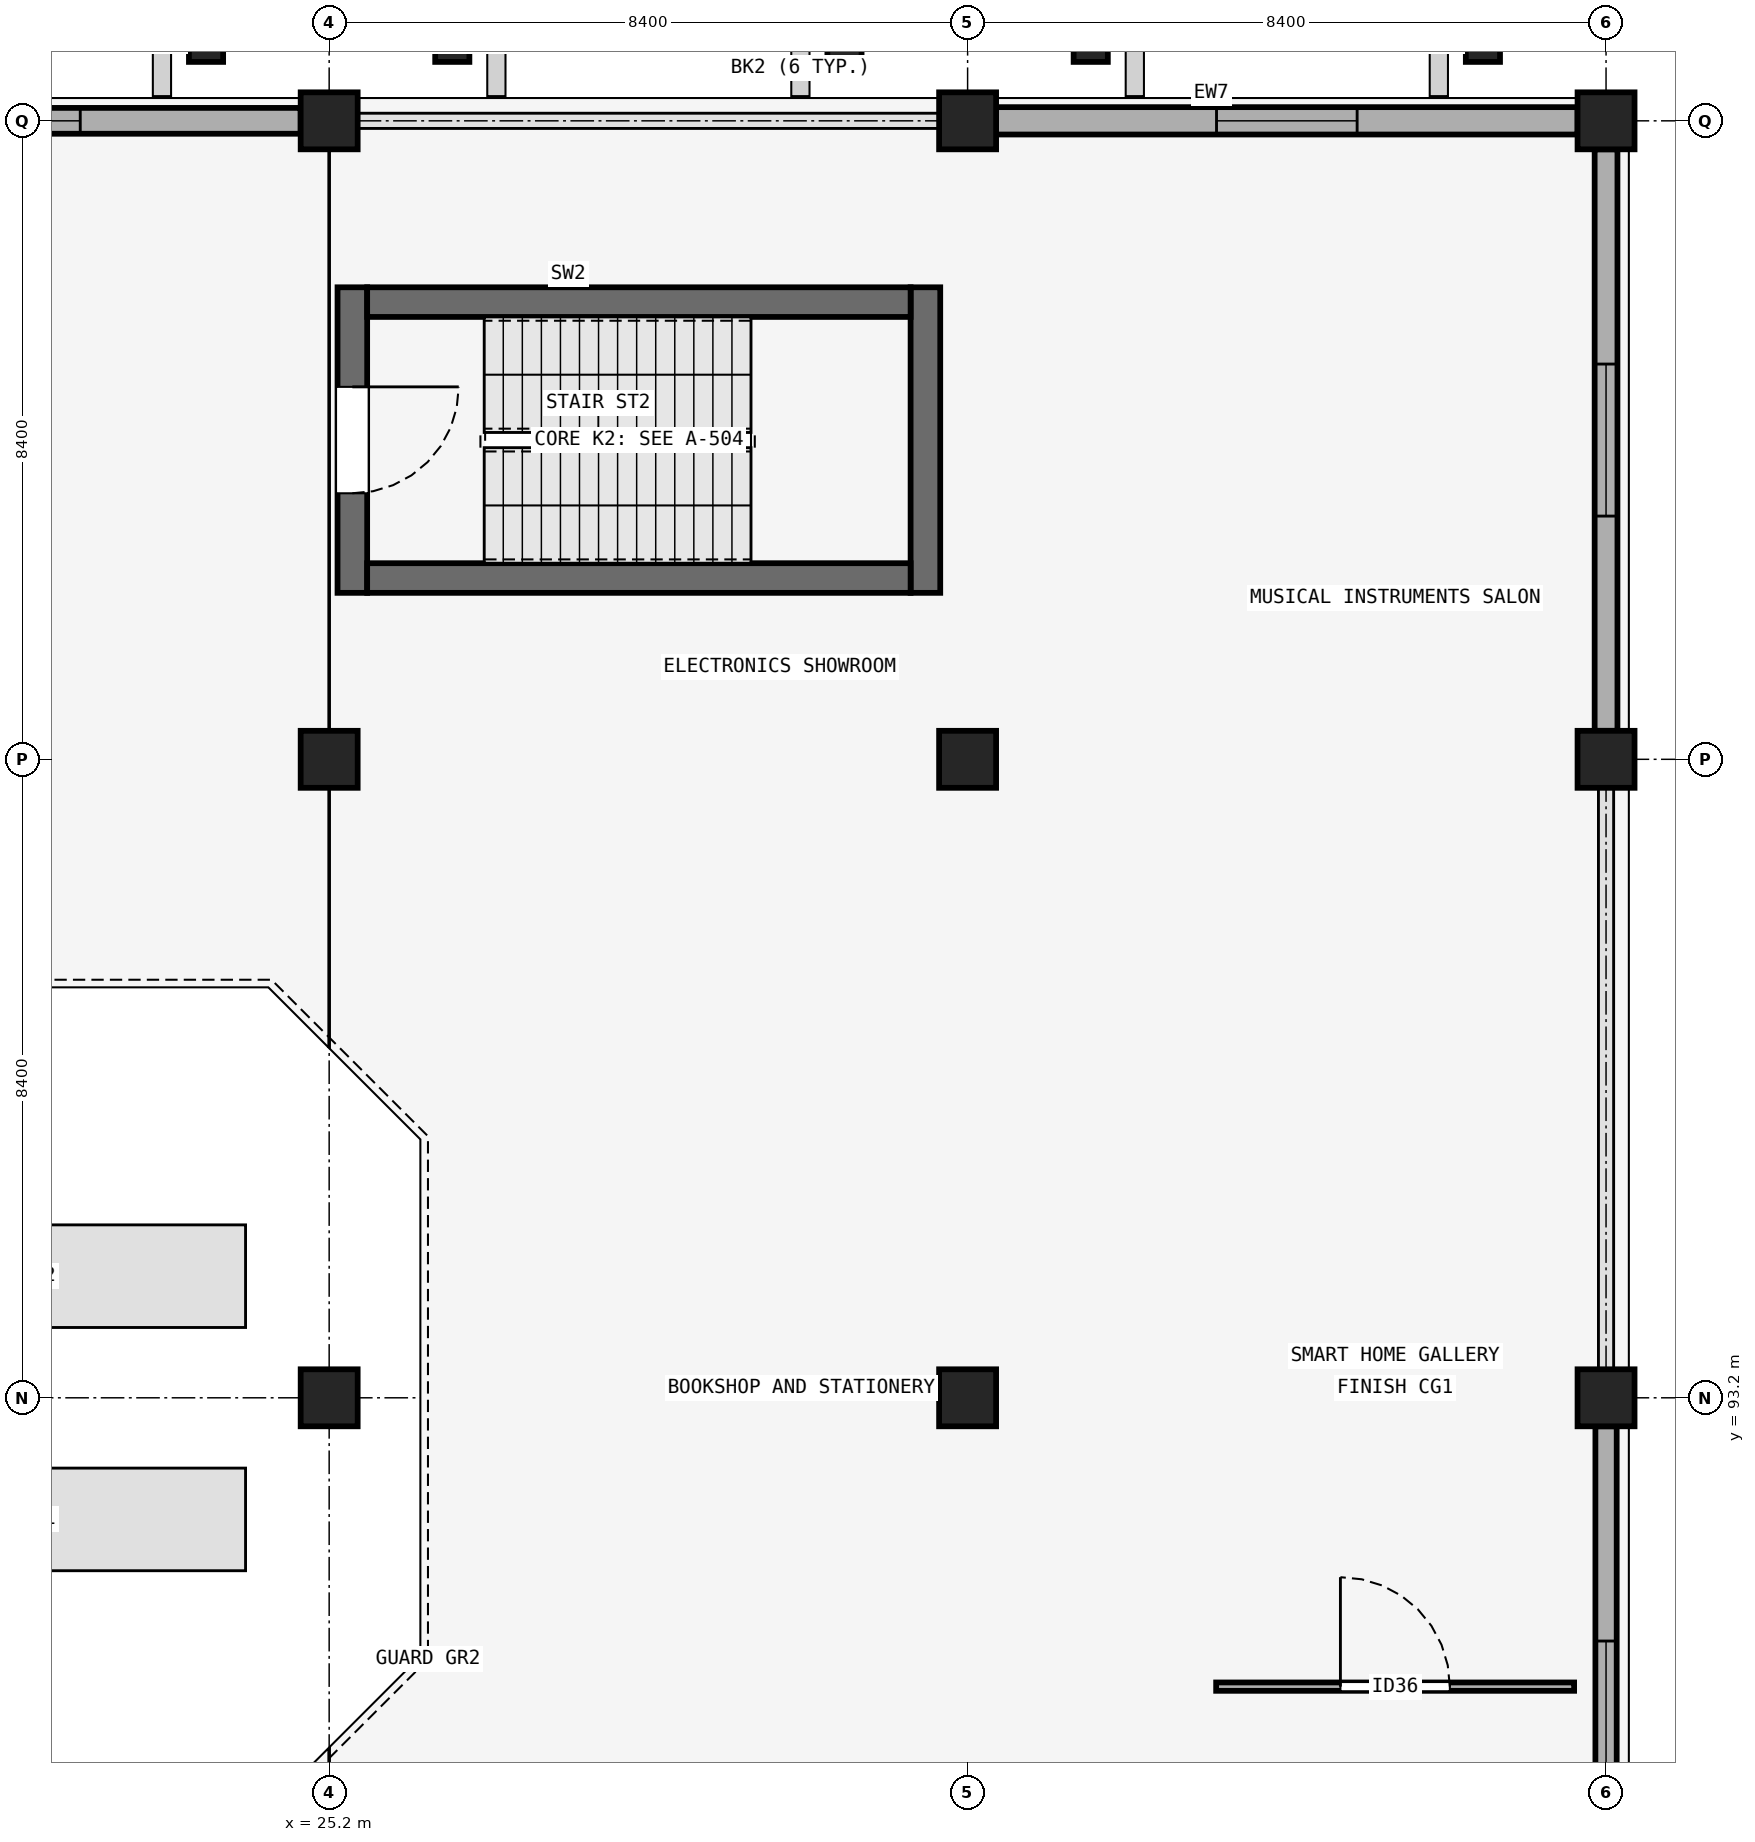
"""IFC4 building model, lengths in metres.
Left out: names, types, materials, properties, quantities, classifications, styles, units other than length and angle.
Written with IfcOpenShell. Run it as: python <this file> out.ifc"""

import sys

from ifc_helpers import new_model, si_unit, direction, frame, frame_2d, origin, origin_2d, place, context, subcontext, project, spatial, rectangle, extrude, element, fill, save


model = new_model("IFC4")
c1 = context("Model", 3, precision=1e-05, world=origin(), true_north=direction((0.0, 1.0)))
c2 = subcontext(c1, "Body", "Model", "MODEL_VIEW")
j1 = project(units=[si_unit("LENGTHUNIT", "METRE"), si_unit("PLANEANGLEUNIT", "RADIAN")], contexts=[c1])
p1 = place(None, origin())
s1 = spatial("IfcSite", under=j1, at=p1, CompositionType="ELEMENT")
p2 = place(p1, origin())
s2 = spatial("IfcBuilding", under=s1, at=p2, CompositionType="ELEMENT")
p3 = place(p2, frame((0.0, 0.0, 23.4)))
s3 = spatial("IfcBuildingStorey", under=s2, at=p3, CompositionType="ELEMENT", Elevation=23.4)
for number, where, z_axis, x_axis in (
    (1, (25.2, 93.2, 0.0), (0.0, 0.0, 1.0), (1.0, 0.0, 0.0)),
    (2, (33.6, 93.2, 0.0), (0.0, 0.0, 1.0), (1.0, 0.0, 0.0)),
    (3, (42.0, 93.2, 0.0), (0.0, 0.0, 1.0), (1.0, 0.0, 0.0)),
    (4, (25.2, 101.6, 0.0), (0.0, 0.0, 1.0), (1.0, 0.0, 0.0)),
    (5, (33.6, 101.6, 0.0), (0.0, 0.0, 1.0), (1.0, 0.0, 0.0)),
    (6, (42.0, 101.6, 0.0), (0.0, 0.0, 1.0), (1.0, 0.0, 0.0)),
    (7, (25.2, 110.0, 0.0), (0.0, 0.0, 1.0), (1.0, 0.0, 0.0)),
    (8, (33.6, 110.0, 0.0), (0.0, 0.0, 1.0), (1.0, 0.0, 0.0)),
    (9, (42.0, 110.0, 0.0), (0.0, 0.0, 1.0), (1.0, 0.0, 0.0)),
):
    element("IfcColumn", number, at=place(p3, frame(where, z_axis=z_axis, x_axis=x_axis)), inside=s3, PredefinedType="COLUMN", context=c2, shape_type="SweptSolid", body=[
        extrude(rectangle(XDim=0.75, YDim=0.75, at=origin_2d()), origin(), (0.0, 0.0, 1.0), 4.5),
    ])
for number, where, z_axis, x_axis in (
    (10, (23.58, 111.05, 0.0), (0.0, 0.0, 1.0), (1.0, 0.0, 0.0)),
    (11, (26.82, 111.05, 0.0), (0.0, 0.0, 1.0), (1.0, 0.0, 0.0)),
    (12, (31.98, 111.05, 0.0), (0.0, 0.0, 1.0), (1.0, 0.0, 0.0)),
    (13, (35.22, 111.05, 0.0), (0.0, 0.0, 1.0), (1.0, 0.0, 0.0)),
    (14, (40.38, 111.05, 0.0), (0.0, 0.0, 1.0), (1.0, 0.0, 0.0)),
):
    element("IfcColumn", number, at=place(p3, frame(where, z_axis=z_axis, x_axis=x_axis)), inside=s3, PredefinedType="PILASTER", context=c2, shape_type="SweptSolid", body=[
        extrude(rectangle(XDim=0.45, YDim=0.55, at=origin_2d()), origin(), (0.0, 0.0, 1.0), 4.5),
    ])
p4 = place(p3, frame((17.175, 110.0, 0.0), z_axis=(0.0, 0.0, 1.0), x_axis=(1.0, 0.0, 0.0)))
e15 = element("IfcWall", 15, at=p4, inside=s3, PredefinedType="SOLIDWALL", context=c2, shape_type="SweptSolid", body=[
    extrude(rectangle(XDim=7.65, YDim=0.34, at=frame_2d((3.825, 0.0))), origin(), (0.0, 0.0, 1.0), 3.45),
])
p5 = place(p4, frame((2.9, 0.0, 0.95)))
e16 = element("IfcOpeningElement", 16, at=p5, cuts=e15, PredefinedType="OPENING", context=c2, shape_type="SweptSolid", body=[
    extrude(rectangle(XDim=1.85, YDim=1.35, at=frame_2d((0.925, 0.675))), frame((0.0, 0.18, 0.0), z_axis=(0.0, -1.0, 0.0), x_axis=(1.0, 0.0, 0.0)), (0.0, 0.0, 1.0), 0.36),
])
p6 = place(p3, frame((33.975, 110.0, 0.0), z_axis=(0.0, 0.0, 1.0), x_axis=(1.0, 0.0, 0.0)))
e17 = element("IfcWall", 17, at=p6, inside=s3, PredefinedType="SOLIDWALL", context=c2, shape_type="SweptSolid", body=[
    extrude(rectangle(XDim=7.65, YDim=0.36, at=frame_2d((3.825, 0.0))), origin(), (0.0, 0.0, 1.0), 3.45),
])
p7 = place(p6, frame((2.9, 0.0, 0.95)))
e18 = element("IfcOpeningElement", 18, at=p7, cuts=e17, PredefinedType="OPENING", context=c2, shape_type="SweptSolid", body=[
    extrude(rectangle(XDim=1.85, YDim=1.6, at=frame_2d((0.925, 0.8))), frame((0.0, 0.19, 0.0), z_axis=(0.0, -1.0, 0.0), x_axis=(1.0, 0.0, 0.0)), (0.0, 0.0, 1.0), 0.38),
])
p8 = place(p3, frame((42.0, 85.175, 0.0), z_axis=(0.0, 0.0, 1.0), x_axis=(0.0, 1.0, 0.0)))
e19 = element("IfcWall", 19, at=p8, inside=s3, PredefinedType="SOLIDWALL", context=c2, shape_type="SweptSolid", body=[
    extrude(rectangle(XDim=7.65, YDim=0.28, at=frame_2d((3.825, 0.0))), origin(), (0.0, 0.0, 1.0), 3.45),
])
p9 = place(p8, frame((2.825, 0.0, 0.95)))
e20 = element("IfcOpeningElement", 20, at=p9, cuts=e19, PredefinedType="OPENING", context=c2, shape_type="SweptSolid", body=[
    extrude(rectangle(XDim=2.0, YDim=1.35, at=frame_2d((1.0, 0.675))), frame((0.0, 0.15, 0.0), z_axis=(0.0, -1.0, 0.0), x_axis=(1.0, 0.0, 0.0)), (0.0, 0.0, 1.0), 0.3),
])
p10 = place(p3, frame((42.0, 101.975, 0.0), z_axis=(0.0, 0.0, 1.0), x_axis=(0.0, 1.0, 0.0)))
e21 = element("IfcWall", 21, at=p10, inside=s3, PredefinedType="SOLIDWALL", context=c2, shape_type="SweptSolid", body=[
    extrude(rectangle(XDim=7.65, YDim=0.3, at=frame_2d((3.825, 0.0))), origin(), (0.0, 0.0, 1.0), 3.45),
])
p11 = place(p10, frame((2.825, 0.0, 0.95)))
e22 = element("IfcOpeningElement", 22, at=p11, cuts=e21, PredefinedType="OPENING", context=c2, shape_type="SweptSolid", body=[
    extrude(rectangle(XDim=2.0, YDim=1.6, at=frame_2d((1.0, 0.8))), frame((0.0, 0.16, 0.0), z_axis=(0.0, -1.0, 0.0), x_axis=(1.0, 0.0, 0.0)), (0.0, 0.0, 1.0), 0.32),
])
p12 = place(p3, frame((25.505, 107.81, 0.0), z_axis=(0.0, 0.0, 1.0), x_axis=(0.0, -1.0, 0.0)))
e23 = element("IfcWall", 23, at=p12, inside=s3, PredefinedType="SHEAR", context=c2, shape_type="SweptSolid", body=[
    extrude(rectangle(XDim=4.02, YDim=0.39, at=frame_2d((2.01, 0.0))), origin(), (0.0, 0.0, 1.0), 4.2),
])
p13 = place(p12, frame((1.31, 0.0, 0.0)))
e24 = element("IfcOpeningElement", 24, at=p13, cuts=e23, PredefinedType="OPENING", context=c2, shape_type="SweptSolid", body=[
    extrude(rectangle(XDim=1.4, YDim=2.15, at=frame_2d((0.7, 1.075))), frame((0.0, 0.205, 0.0), z_axis=(0.0, -1.0, 0.0), x_axis=(1.0, 0.0, 0.0)), (0.0, 0.0, 1.0), 0.41),
])
p14 = place(p3, frame((33.045, 103.79, 0.0), z_axis=(0.0, 0.0, 1.0), x_axis=(0.0, 1.0, 0.0)))
e25 = element("IfcWall", 25, at=p14, inside=s3, PredefinedType="SHEAR", context=c2, shape_type="SweptSolid", body=[
    extrude(rectangle(XDim=4.02, YDim=0.39, at=frame_2d((2.01, 0.0))), origin(), (0.0, 0.0, 1.0), 4.2),
])
for number, where, z_axis, x_axis in (
    (26, (25.7, 103.985, 0.0), (0.0, 0.0, 1.0), (1.0, 0.0, 0.0)),
    (27, (25.7, 107.615, 0.0), (0.0, 0.0, 1.0), (1.0, 0.0, 0.0)),
):
    element("IfcWall", number, at=place(p3, frame(where, z_axis=z_axis, x_axis=x_axis)), inside=s3, PredefinedType="SHEAR", context=c2, shape_type="SweptSolid", body=[
        extrude(rectangle(XDim=7.15, YDim=0.39, at=frame_2d((3.575, 0.0))), origin(), (0.0, 0.0, 1.0), 4.2),
    ])
p15 = place(p3, frame((36.87, 89.4, 0.0), z_axis=(0.0, 0.0, 1.0), x_axis=(1.0, 0.0, 0.0)))
e28 = element("IfcWall", 28, at=p15, inside=s3, PredefinedType="PARTITIONING", context=c2, shape_type="SweptSolid", body=[
    extrude(rectangle(XDim=4.71, YDim=0.11, at=frame_2d((2.355, 0.0))), origin(), (0.0, 0.0, 1.0), 4.2),
])
p16 = place(p15, frame((1.635, 0.0, 0.0)))
e29 = element("IfcOpeningElement", 29, at=p16, cuts=e28, PredefinedType="OPENING", context=c2, shape_type="SweptSolid", body=[
    extrude(rectangle(XDim=1.44, YDim=2.22, at=frame_2d((0.72, 1.11))), frame((0.0, 0.065, 0.0), z_axis=(0.0, -1.0, 0.0), x_axis=(1.0, 0.0, 0.0)), (0.0, 0.0, 1.0), 0.13),
])
p17 = place(p5, origin())
e30 = element("IfcWindow", 30, at=p17, inside=s3, PartitioningType="DOUBLE_PANEL_VERTICAL", PredefinedType="WINDOW", context=c2, shape_type="SweptSolid", body=[
    extrude(rectangle(XDim=1.85, YDim=1.35, at=frame_2d((0.925, 0.675))), frame((0.0, 0.03, 0.0), z_axis=(0.0, -1.0, 0.0), x_axis=(1.0, 0.0, 0.0)), (0.0, 0.0, 1.0), 0.06),
])
fill(e16, e30)
p18 = place(p7, origin())
e31 = element("IfcWindow", 31, at=p18, inside=s3, PartitioningType="DOUBLE_PANEL_VERTICAL", PredefinedType="WINDOW", context=c2, shape_type="SweptSolid", body=[
    extrude(rectangle(XDim=1.85, YDim=1.6, at=frame_2d((0.925, 0.8))), frame((0.0, 0.03, 0.0), z_axis=(0.0, -1.0, 0.0), x_axis=(1.0, 0.0, 0.0)), (0.0, 0.0, 1.0), 0.06),
])
fill(e18, e31)
p19 = place(p9, origin())
e32 = element("IfcWindow", 32, at=p19, inside=s3, PartitioningType="DOUBLE_PANEL_VERTICAL", PredefinedType="WINDOW", context=c2, shape_type="SweptSolid", body=[
    extrude(rectangle(XDim=2.0, YDim=1.35, at=frame_2d((1.0, 0.675))), frame((0.0, 0.03, 0.0), z_axis=(0.0, -1.0, 0.0), x_axis=(1.0, 0.0, 0.0)), (0.0, 0.0, 1.0), 0.06),
])
fill(e20, e32)
p20 = place(p11, origin())
e33 = element("IfcWindow", 33, at=p20, inside=s3, PartitioningType="DOUBLE_PANEL_VERTICAL", PredefinedType="WINDOW", context=c2, shape_type="SweptSolid", body=[
    extrude(rectangle(XDim=2.0, YDim=1.6, at=frame_2d((1.0, 0.8))), frame((0.0, 0.03, 0.0), z_axis=(0.0, -1.0, 0.0), x_axis=(1.0, 0.0, 0.0)), (0.0, 0.0, 1.0), 0.06),
])
fill(e22, e33)
p21 = place(p13, origin())
e34 = element("IfcDoor", 34, at=p21, inside=s3, OperationType="SINGLE_SWING_LEFT", PredefinedType="DOOR", context=c2, shape_type="SweptSolid", body=[
    extrude(rectangle(XDim=1.4, YDim=2.15, at=frame_2d((0.7, 1.075))), frame((0.0, 0.025, 0.0), z_axis=(0.0, -1.0, 0.0), x_axis=(1.0, 0.0, 0.0)), (0.0, 0.0, 1.0), 0.05),
])
fill(e24, e34)
p22 = place(p16, origin())
e35 = element("IfcDoor", 35, at=p22, inside=s3, OperationType="SINGLE_SWING_LEFT", PredefinedType="DOOR", context=c2, shape_type="SweptSolid", body=[
    extrude(rectangle(XDim=1.44, YDim=2.22, at=frame_2d((0.72, 1.11))), frame((0.0, 0.025, 0.0), z_axis=(0.0, -1.0, 0.0), x_axis=(1.0, 0.0, 0.0)), (0.0, 0.0, 1.0), 0.05),
])
fill(e29, e35)
save(model, sys.argv[1])
